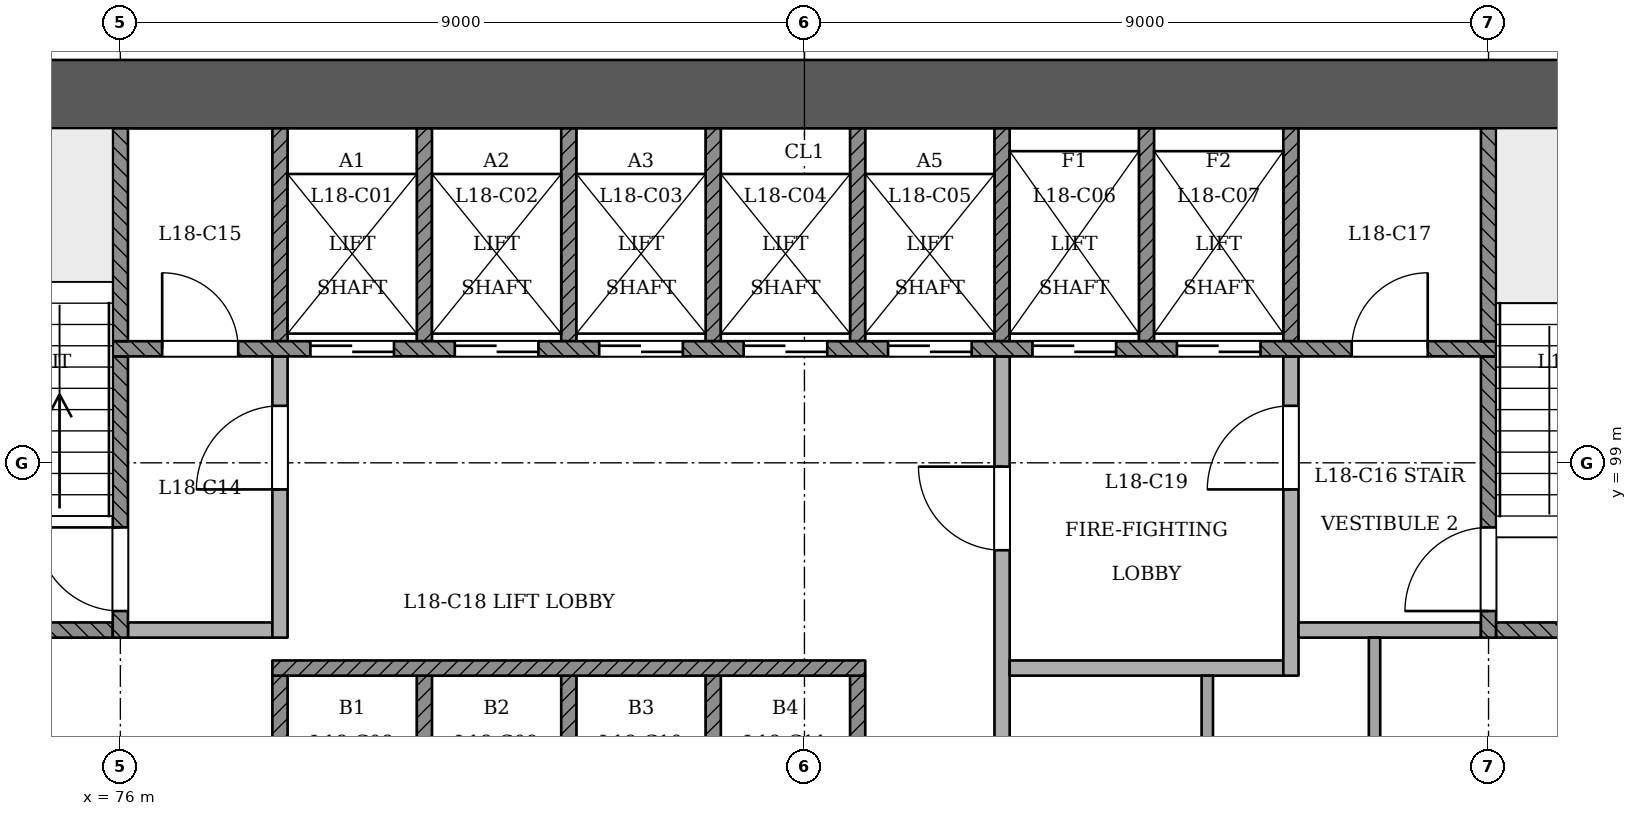
"""IFC4 building model, lengths in metres.
Left out: names, types, materials, properties, quantities, classifications, styles, units other than length and angle.
Written with IfcOpenShell. Run it as: python <this file> out.ifc"""

import sys

from ifc_helpers import new_model, si_unit, direction, frame, frame_2d, origin, place, context, subcontext, project, spatial, rectangle, extrude, element, fill, save


model = new_model("IFC4")
c1 = context("Model", 3, precision=1e-05, world=origin(), true_north=direction((0.0, 1.0)))
c2 = subcontext(c1, "Body", "Model", "MODEL_VIEW")
j1 = project(units=[si_unit("LENGTHUNIT", "METRE"), si_unit("PLANEANGLEUNIT", "RADIAN")], contexts=[c1])
p1 = place(None, origin())
s1 = spatial("IfcSite", under=j1, at=p1, CompositionType="ELEMENT")
p2 = place(p1, origin())
s2 = spatial("IfcBuilding", under=s1, at=p2, CompositionType="ELEMENT")
p3 = place(p2, frame((0.0, 0.0, 73.8)))
s3 = spatial("IfcBuildingStorey", under=s2, at=p3, CompositionType="ELEMENT", Elevation=73.8)
p4 = place(p3, frame((97.45, 103.85, 0.0), z_axis=(0.0, 0.0, 1.0), x_axis=(-1.0, 0.0, 0.0)))
e1 = element("IfcWall", 1, at=p4, inside=s3, PredefinedType="SHEAR", context=c2, shape_type="SweptSolid", body=[
    extrude(rectangle(XDim=25.35, YDim=0.9, at=frame_2d((12.675, 0.0))), origin(), (0.0, 0.0, 1.0), 3.6),
])
p5 = place(p3, frame((85.747, 59.896, 0.0), z_axis=(0.0, 0.0, 1.0), x_axis=(0.500002549277, 0.866023931954, 0.0)))
e2 = element("IfcWall", 2, at=p5, inside=s3, PredefinedType="PARTITIONING", context=c2, shape_type="SweptSolid", body=[
    extrude(rectangle(XDim=43.082, YDim=0.15, at=frame_2d((21.541, 0.0))), origin(), (0.0, 0.0, 1.0), 2.7),
])
p6 = place(p5, frame((0.244, 0.0, 0.0)))
e3 = element("IfcOpeningElement", 3, at=p6, cuts=e2, PredefinedType="OPENING", context=c2, shape_type="SweptSolid", body=[
    extrude(rectangle(XDim=1.2, YDim=2.1, at=frame_2d((0.6, 1.05))), frame((0.0, 0.085, 0.0), z_axis=(0.0, -1.0, 0.0), x_axis=(1.0, 0.0, 0.0)), (0.0, 0.0, 1.0), 0.171),
])
p7 = place(p5, frame((4.146, 0.0, 0.0)))
e4 = element("IfcOpeningElement", 4, at=p7, cuts=e2, PredefinedType="OPENING", context=c2, shape_type="SweptSolid", body=[
    extrude(rectangle(XDim=1.0, YDim=2.1, at=frame_2d((0.5, 1.05))), frame((0.0, 0.085, 0.0), z_axis=(0.0, -1.0, 0.0), x_axis=(1.0, 0.0, 0.0)), (0.0, 0.0, 1.0), 0.171),
])
p8 = place(p5, frame((10.821, 0.0, 0.0)))
e5 = element("IfcOpeningElement", 5, at=p8, cuts=e2, PredefinedType="OPENING", context=c2, shape_type="SweptSolid", body=[
    extrude(rectangle(XDim=1.0, YDim=2.1, at=frame_2d((0.5, 1.05))), frame((0.0, 0.085, 0.0), z_axis=(0.0, -1.0, 0.0), x_axis=(1.0, 0.0, 0.0)), (0.0, 0.0, 1.0), 0.171),
])
p9 = place(p5, frame((13.262, 0.0, 0.0)))
e6 = element("IfcOpeningElement", 6, at=p9, cuts=e2, PredefinedType="OPENING", context=c2, shape_type="SweptSolid", body=[
    extrude(rectangle(XDim=1.0, YDim=2.1, at=frame_2d((0.5, 1.05))), frame((0.0, 0.085, 0.0), z_axis=(0.0, -1.0, 0.0), x_axis=(1.0, 0.0, 0.0)), (0.0, 0.0, 1.0), 0.171),
])
p10 = place(p5, frame((20.941, 0.0, 0.0)))
e7 = element("IfcOpeningElement", 7, at=p10, cuts=e2, PredefinedType="OPENING", context=c2, shape_type="SweptSolid", body=[
    extrude(rectangle(XDim=1.2, YDim=2.1, at=frame_2d((0.6, 1.05))), frame((0.0, 0.085, 0.0), z_axis=(0.0, -1.0, 0.0), x_axis=(1.0, 0.0, 0.0)), (0.0, 0.0, 1.0), 0.171),
])
p11 = place(p5, frame((28.821, 0.0, 0.0)))
e8 = element("IfcOpeningElement", 8, at=p11, cuts=e2, PredefinedType="OPENING", context=c2, shape_type="SweptSolid", body=[
    extrude(rectangle(XDim=1.0, YDim=2.1, at=frame_2d((0.5, 1.05))), frame((0.0, 0.085, 0.0), z_axis=(0.0, -1.0, 0.0), x_axis=(1.0, 0.0, 0.0)), (0.0, 0.0, 1.0), 0.171),
])
p12 = place(p5, frame((31.112, 0.0, 0.0)))
e9 = element("IfcOpeningElement", 9, at=p12, cuts=e2, PredefinedType="OPENING", context=c2, shape_type="SweptSolid", body=[
    extrude(rectangle(XDim=1.1, YDim=2.1, at=frame_2d((0.55, 1.05))), frame((0.0, 0.085, 0.0), z_axis=(0.0, -1.0, 0.0), x_axis=(1.0, 0.0, 0.0)), (0.0, 0.0, 1.0), 0.171),
])
p13 = place(p5, frame((38.514, 0.0, 0.0)))
e10 = element("IfcOpeningElement", 10, at=p13, cuts=e2, PredefinedType="OPENING", context=c2, shape_type="SweptSolid", body=[
    extrude(rectangle(XDim=1.2, YDim=2.1, at=frame_2d((0.6, 1.05))), frame((0.0, 0.085, 0.0), z_axis=(0.0, -1.0, 0.0), x_axis=(1.0, 0.0, 0.0)), (0.0, 0.0, 1.0), 0.171),
])
for number, where, z_axis, x_axis in (
    (11, (78.1, 93.4, 0.0), (0.0, 0.0, 1.0), (0.0, 1.0, 0.0)),
    (12, (80.0, 93.4, 0.0), (0.0, 0.0, 1.0), (0.0, 1.0, 0.0)),
    (13, (81.9, 93.4, 0.0), (0.0, 0.0, 1.0), (0.0, 1.0, 0.0)),
    (14, (83.8, 93.4, 0.0), (0.0, 0.0, 1.0), (0.0, 1.0, 0.0)),
    (15, (85.7, 93.4, 0.0), (0.0, 0.0, 1.0), (0.0, 1.0, 0.0)),
):
    element("IfcWall", number, at=place(p3, frame(where, z_axis=z_axis, x_axis=x_axis)), inside=s3, PredefinedType="SOLIDWALL", context=c2, shape_type="SweptSolid", body=[
        extrude(rectangle(XDim=2.8, YDim=0.2, at=frame_2d((1.4, 0.0))), origin(), (0.0, 0.0, 1.0), 3.1),
    ])
p14 = place(p3, frame((87.6, 93.4, 0.0), z_axis=(0.0, 0.0, 1.0), x_axis=(0.0, 1.0, 0.0)))
e16 = element("IfcWall", 16, at=p14, inside=s3, PredefinedType="PARTITIONING", context=c2, shape_type="SweptSolid", body=[
    extrude(rectangle(XDim=7.0, YDim=0.2, at=frame_2d((3.5, 0.0))), origin(), (0.0, 0.0, 1.0), 3.1),
])
p15 = place(p14, frame((4.45, 0.0, 0.0)))
e17 = element("IfcOpeningElement", 17, at=p15, cuts=e16, PredefinedType="OPENING", context=c2, shape_type="SweptSolid", body=[
    extrude(rectangle(XDim=1.1, YDim=2.1, at=frame_2d((0.55, 1.05))), frame((0.0, 0.11, 0.0), z_axis=(0.0, -1.0, 0.0), x_axis=(1.0, 0.0, 0.0)), (0.0, 0.0, 1.0), 0.221),
])
p16 = place(p3, frame((90.3, 93.4, 0.0), z_axis=(0.0, 0.0, 1.0), x_axis=(0.0, 1.0, 0.0)))
e18 = element("IfcWall", 18, at=p16, inside=s3, PredefinedType="PARTITIONING", context=c2, shape_type="SweptSolid", body=[
    extrude(rectangle(XDim=2.8, YDim=0.15, at=frame_2d((1.4, 0.0))), origin(), (0.0, 0.0, 1.0), 3.1),
])
p17 = place(p3, frame((92.5, 93.4, 0.0), z_axis=(0.0, 0.0, 1.0), x_axis=(0.0, 1.0, 0.0)))
e19 = element("IfcWall", 19, at=p17, inside=s3, PredefinedType="PARTITIONING", context=c2, shape_type="SweptSolid", body=[
    extrude(rectangle(XDim=3.3, YDim=0.15, at=frame_2d((1.65, 0.0))), origin(), (0.0, 0.0, 1.0), 3.1),
])
p18 = place(p3, frame((78.0, 96.3, 0.0), z_axis=(0.0, 0.0, 1.0), x_axis=(1.0, 0.0, 0.0)))
e20 = element("IfcWall", 20, at=p18, inside=s3, PredefinedType="SOLIDWALL", context=c2, shape_type="SweptSolid", body=[
    extrude(rectangle(XDim=7.8, YDim=0.2, at=frame_2d((3.9, 0.0))), origin(), (0.0, 0.0, 1.0), 3.1),
])
p19 = place(p3, frame((87.7, 96.3, 0.0), z_axis=(0.0, 0.0, 1.0), x_axis=(1.0, 0.0, 0.0)))
e21 = element("IfcWall", 21, at=p19, inside=s3, PredefinedType="PARTITIONING", context=c2, shape_type="SweptSolid", body=[
    extrude(rectangle(XDim=3.6, YDim=0.2, at=frame_2d((1.8, 0.0))), origin(), (0.0, 0.0, 1.0), 3.1),
])
p20 = place(p3, frame((91.4, 96.2, 0.0), z_axis=(0.0, 0.0, 1.0), x_axis=(0.0, 1.0, 0.0)))
e22 = element("IfcWall", 22, at=p20, inside=s3, PredefinedType="PARTITIONING", context=c2, shape_type="SweptSolid", body=[
    extrude(rectangle(XDim=4.2, YDim=0.2, at=frame_2d((2.1, 0.0))), origin(), (0.0, 0.0, 1.0), 3.1),
])
p21 = place(p20, frame((2.45, 0.0, 0.0)))
e23 = element("IfcOpeningElement", 23, at=p21, cuts=e22, PredefinedType="OPENING", context=c2, shape_type="SweptSolid", body=[
    extrude(rectangle(XDim=1.1, YDim=2.1, at=frame_2d((0.55, 1.05))), frame((0.0, 0.11, 0.0), z_axis=(0.0, -1.0, 0.0), x_axis=(1.0, 0.0, 0.0)), (0.0, 0.0, 1.0), 0.221),
])
p22 = place(p3, frame((73.0, 96.8, 0.0), z_axis=(0.0, 0.0, 1.0), x_axis=(1.0, 0.0, 0.0)))
e24 = element("IfcWall", 24, at=p22, inside=s3, PredefinedType="SOLIDWALL", context=c2, shape_type="SweptSolid", body=[
    extrude(rectangle(XDim=2.9, YDim=0.2, at=frame_2d((1.45, 0.0))), origin(), (0.0, 0.0, 1.0), 3.1),
])
p23 = place(p3, frame((76.0, 96.7, 0.0), z_axis=(0.0, 0.0, 1.0), x_axis=(0.0, 1.0, 0.0)))
e25 = element("IfcWall", 25, at=p23, inside=s3, PredefinedType="SOLIDWALL", context=c2, shape_type="SweptSolid", body=[
    extrude(rectangle(XDim=3.7, YDim=0.2, at=frame_2d((1.85, 0.0))), origin(), (0.0, 0.0, 1.0), 3.1),
])
p24 = place(p23, frame((0.35, 0.0, 0.0)))
e26 = element("IfcOpeningElement", 26, at=p24, cuts=e25, PredefinedType="OPENING", context=c2, shape_type="SweptSolid", body=[
    extrude(rectangle(XDim=1.1, YDim=2.1, at=frame_2d((0.55, 1.05))), frame((0.0, 0.11, 0.0), z_axis=(0.0, -1.0, 0.0), x_axis=(1.0, 0.0, 0.0)), (0.0, 0.0, 1.0), 0.221),
])
p25 = place(p3, frame((76.1, 96.8, 0.0), z_axis=(0.0, 0.0, 1.0), x_axis=(1.0, 0.0, 0.0)))
e27 = element("IfcWall", 27, at=p25, inside=s3, PredefinedType="PARTITIONING", context=c2, shape_type="SweptSolid", body=[
    extrude(rectangle(XDim=1.9, YDim=0.2, at=frame_2d((0.95, 0.0))), origin(), (0.0, 0.0, 1.0), 3.1),
])
p26 = place(p3, frame((78.1, 96.7, 0.0), z_axis=(0.0, 0.0, 1.0), x_axis=(0.0, 1.0, 0.0)))
e28 = element("IfcWall", 28, at=p26, inside=s3, PredefinedType="PARTITIONING", context=c2, shape_type="SweptSolid", body=[
    extrude(rectangle(XDim=3.7, YDim=0.2, at=frame_2d((1.85, 0.0))), origin(), (0.0, 0.0, 1.0), 3.1),
])
p27 = place(p26, frame((1.95, 0.0, 0.0)))
e29 = element("IfcOpeningElement", 29, at=p27, cuts=e28, PredefinedType="OPENING", context=c2, shape_type="SweptSolid", body=[
    extrude(rectangle(XDim=1.1, YDim=2.1, at=frame_2d((0.55, 1.05))), frame((0.0, 0.11, 0.0), z_axis=(0.0, -1.0, 0.0), x_axis=(1.0, 0.0, 0.0)), (0.0, 0.0, 1.0), 0.221),
])
p28 = place(p3, frame((91.5, 96.8, 0.0), z_axis=(0.0, 0.0, 1.0), x_axis=(1.0, 0.0, 0.0)))
e30 = element("IfcWall", 30, at=p28, inside=s3, PredefinedType="PARTITIONING", context=c2, shape_type="SweptSolid", body=[
    extrude(rectangle(XDim=2.4, YDim=0.2, at=frame_2d((1.2, 0.0))), origin(), (0.0, 0.0, 1.0), 3.1),
])
p29 = place(p3, frame((94.0, 96.7, 0.0), z_axis=(0.0, 0.0, 1.0), x_axis=(0.0, 1.0, 0.0)))
e31 = element("IfcWall", 31, at=p29, inside=s3, PredefinedType="SOLIDWALL", context=c2, shape_type="SweptSolid", body=[
    extrude(rectangle(XDim=3.7, YDim=0.2, at=frame_2d((1.85, 0.0))), origin(), (0.0, 0.0, 1.0), 3.1),
])
p30 = place(p29, frame((0.35, 0.0, 0.0)))
e32 = element("IfcOpeningElement", 32, at=p30, cuts=e31, PredefinedType="OPENING", context=c2, shape_type="SweptSolid", body=[
    extrude(rectangle(XDim=1.1, YDim=2.1, at=frame_2d((0.55, 1.05))), frame((0.0, 0.11, 0.0), z_axis=(0.0, -1.0, 0.0), x_axis=(1.0, 0.0, 0.0)), (0.0, 0.0, 1.0), 0.221),
])
p31 = place(p3, frame((94.1, 96.8, 0.0), z_axis=(0.0, 0.0, 1.0), x_axis=(1.0, 0.0, 0.0)))
e33 = element("IfcWall", 33, at=p31, inside=s3, PredefinedType="SOLIDWALL", context=c2, shape_type="SweptSolid", body=[
    extrude(rectangle(XDim=2.9, YDim=0.2, at=frame_2d((1.45, 0.0))), origin(), (0.0, 0.0, 1.0), 3.1),
])
p32 = place(p3, frame((75.9, 100.5, 0.0), z_axis=(0.0, 0.0, 1.0), x_axis=(1.0, 0.0, 0.0)))
e34 = element("IfcWall", 34, at=p32, inside=s3, PredefinedType="SOLIDWALL", context=c2, shape_type="SweptSolid", body=[
    extrude(rectangle(XDim=18.2, YDim=0.2, at=frame_2d((9.1, 0.0))), origin(), (0.0, 0.0, 1.0), 3.1),
])
p33 = place(p32, frame((2.6, 0.0, 0.0)))
e35 = element("IfcOpeningElement", 35, at=p33, cuts=e34, PredefinedType="OPENING", context=c2, shape_type="SweptSolid", body=[
    extrude(rectangle(XDim=1.1, YDim=2.1, at=frame_2d((0.55, 1.05))), frame((0.0, 0.11, 0.0), z_axis=(0.0, -1.0, 0.0), x_axis=(1.0, 0.0, 0.0)), (0.0, 0.0, 1.0), 0.221),
])
p34 = place(p32, frame((4.5, 0.0, 0.0)))
e36 = element("IfcOpeningElement", 36, at=p34, cuts=e34, PredefinedType="OPENING", context=c2, shape_type="SweptSolid", body=[
    extrude(rectangle(XDim=1.1, YDim=2.1, at=frame_2d((0.55, 1.05))), frame((0.0, 0.11, 0.0), z_axis=(0.0, -1.0, 0.0), x_axis=(1.0, 0.0, 0.0)), (0.0, 0.0, 1.0), 0.221),
])
p35 = place(p32, frame((6.4, 0.0, 0.0)))
e37 = element("IfcOpeningElement", 37, at=p35, cuts=e34, PredefinedType="OPENING", context=c2, shape_type="SweptSolid", body=[
    extrude(rectangle(XDim=1.1, YDim=2.1, at=frame_2d((0.55, 1.05))), frame((0.0, 0.11, 0.0), z_axis=(0.0, -1.0, 0.0), x_axis=(1.0, 0.0, 0.0)), (0.0, 0.0, 1.0), 0.221),
])
p36 = place(p32, frame((8.3, 0.0, 0.0)))
e38 = element("IfcOpeningElement", 38, at=p36, cuts=e34, PredefinedType="OPENING", context=c2, shape_type="SweptSolid", body=[
    extrude(rectangle(XDim=1.1, YDim=2.1, at=frame_2d((0.55, 1.05))), frame((0.0, 0.11, 0.0), z_axis=(0.0, -1.0, 0.0), x_axis=(1.0, 0.0, 0.0)), (0.0, 0.0, 1.0), 0.221),
])
p37 = place(p32, frame((10.2, 0.0, 0.0)))
e39 = element("IfcOpeningElement", 39, at=p37, cuts=e34, PredefinedType="OPENING", context=c2, shape_type="SweptSolid", body=[
    extrude(rectangle(XDim=1.1, YDim=2.1, at=frame_2d((0.55, 1.05))), frame((0.0, 0.11, 0.0), z_axis=(0.0, -1.0, 0.0), x_axis=(1.0, 0.0, 0.0)), (0.0, 0.0, 1.0), 0.221),
])
p38 = place(p32, frame((12.1, 0.0, 0.0)))
e40 = element("IfcOpeningElement", 40, at=p38, cuts=e34, PredefinedType="OPENING", context=c2, shape_type="SweptSolid", body=[
    extrude(rectangle(XDim=1.1, YDim=2.1, at=frame_2d((0.55, 1.05))), frame((0.0, 0.11, 0.0), z_axis=(0.0, -1.0, 0.0), x_axis=(1.0, 0.0, 0.0)), (0.0, 0.0, 1.0), 0.221),
])
p39 = place(p32, frame((14.0, 0.0, 0.0)))
e41 = element("IfcOpeningElement", 41, at=p39, cuts=e34, PredefinedType="OPENING", context=c2, shape_type="SweptSolid", body=[
    extrude(rectangle(XDim=1.1, YDim=2.1, at=frame_2d((0.55, 1.05))), frame((0.0, 0.11, 0.0), z_axis=(0.0, -1.0, 0.0), x_axis=(1.0, 0.0, 0.0)), (0.0, 0.0, 1.0), 0.221),
])
p40 = place(p32, frame((0.65, 0.0, 0.0)))
e42 = element("IfcOpeningElement", 42, at=p40, cuts=e34, PredefinedType="OPENING", context=c2, shape_type="SweptSolid", body=[
    extrude(rectangle(XDim=1.0, YDim=2.1, at=frame_2d((0.5, 1.05))), frame((0.0, 0.11, 0.0), z_axis=(0.0, -1.0, 0.0), x_axis=(1.0, 0.0, 0.0)), (0.0, 0.0, 1.0), 0.221),
])
p41 = place(p32, frame((16.3, 0.0, 0.0)))
e43 = element("IfcOpeningElement", 43, at=p41, cuts=e34, PredefinedType="OPENING", context=c2, shape_type="SweptSolid", body=[
    extrude(rectangle(XDim=1.0, YDim=2.1, at=frame_2d((0.5, 1.05))), frame((0.0, 0.11, 0.0), z_axis=(0.0, -1.0, 0.0), x_axis=(1.0, 0.0, 0.0)), (0.0, 0.0, 1.0), 0.221),
])
for number, where, z_axis, x_axis in (
    (44, (76.0, 100.6, 0.0), (0.0, 0.0, 1.0), (0.0, 1.0, 0.0)),
    (45, (78.1, 100.6, 0.0), (0.0, 0.0, 1.0), (0.0, 1.0, 0.0)),
    (46, (80.0, 100.6, 0.0), (0.0, 0.0, 1.0), (0.0, 1.0, 0.0)),
    (47, (81.9, 100.6, 0.0), (0.0, 0.0, 1.0), (0.0, 1.0, 0.0)),
    (48, (83.8, 100.6, 0.0), (0.0, 0.0, 1.0), (0.0, 1.0, 0.0)),
    (49, (85.7, 100.6, 0.0), (0.0, 0.0, 1.0), (0.0, 1.0, 0.0)),
    (50, (87.6, 100.6, 0.0), (0.0, 0.0, 1.0), (0.0, 1.0, 0.0)),
    (51, (89.5, 100.6, 0.0), (0.0, 0.0, 1.0), (0.0, 1.0, 0.0)),
    (52, (91.4, 100.6, 0.0), (0.0, 0.0, 1.0), (0.0, 1.0, 0.0)),
    (53, (94.0, 100.6, 0.0), (0.0, 0.0, 1.0), (0.0, 1.0, 0.0)),
):
    element("IfcWall", number, at=place(p3, frame(where, z_axis=z_axis, x_axis=x_axis)), inside=s3, PredefinedType="SOLIDWALL", context=c2, shape_type="SweptSolid", body=[
        extrude(rectangle(XDim=2.8, YDim=0.2, at=frame_2d((1.4, 0.0))), origin(), (0.0, 0.0, 1.0), 3.1),
    ])
p42 = place(p33, origin())
e54 = element("IfcDoor", 54, at=p42, inside=s3, OperationType="SLIDING_TO_RIGHT", PredefinedType="NOTDEFINED", context=c2, shape_type="SweptSolid", body=[
    extrude(rectangle(XDim=1.1, YDim=2.1, at=frame_2d((0.55, 1.05))), frame((0.0, 0.025, 0.0), z_axis=(0.0, -1.0, 0.0), x_axis=(1.0, 0.0, 0.0)), (0.0, 0.0, 1.0), 0.05),
])
fill(e35, e54)
p43 = place(p34, origin())
e55 = element("IfcDoor", 55, at=p43, inside=s3, OperationType="SLIDING_TO_LEFT", PredefinedType="NOTDEFINED", context=c2, shape_type="SweptSolid", body=[
    extrude(rectangle(XDim=1.1, YDim=2.1, at=frame_2d((0.55, 1.05))), frame((0.0, 0.025, 0.0), z_axis=(0.0, -1.0, 0.0), x_axis=(1.0, 0.0, 0.0)), (0.0, 0.0, 1.0), 0.05),
])
fill(e36, e55)
p44 = place(p35, origin())
e56 = element("IfcDoor", 56, at=p44, inside=s3, OperationType="SLIDING_TO_RIGHT", PredefinedType="NOTDEFINED", context=c2, shape_type="SweptSolid", body=[
    extrude(rectangle(XDim=1.1, YDim=2.1, at=frame_2d((0.55, 1.05))), frame((0.0, 0.025, 0.0), z_axis=(0.0, -1.0, 0.0), x_axis=(1.0, 0.0, 0.0)), (0.0, 0.0, 1.0), 0.05),
])
fill(e37, e56)
p45 = place(p36, origin())
e57 = element("IfcDoor", 57, at=p45, inside=s3, OperationType="SLIDING_TO_LEFT", PredefinedType="NOTDEFINED", context=c2, shape_type="SweptSolid", body=[
    extrude(rectangle(XDim=1.1, YDim=2.1, at=frame_2d((0.55, 1.05))), frame((0.0, 0.025, 0.0), z_axis=(0.0, -1.0, 0.0), x_axis=(1.0, 0.0, 0.0)), (0.0, 0.0, 1.0), 0.05),
])
fill(e38, e57)
p46 = place(p37, origin())
e58 = element("IfcDoor", 58, at=p46, inside=s3, OperationType="SLIDING_TO_RIGHT", PredefinedType="NOTDEFINED", context=c2, shape_type="SweptSolid", body=[
    extrude(rectangle(XDim=1.1, YDim=2.1, at=frame_2d((0.55, 1.05))), frame((0.0, 0.025, 0.0), z_axis=(0.0, -1.0, 0.0), x_axis=(1.0, 0.0, 0.0)), (0.0, 0.0, 1.0), 0.05),
])
fill(e39, e58)
p47 = place(p38, origin())
e59 = element("IfcDoor", 59, at=p47, inside=s3, OperationType="SLIDING_TO_RIGHT", PredefinedType="NOTDEFINED", context=c2, shape_type="SweptSolid", body=[
    extrude(rectangle(XDim=1.1, YDim=2.1, at=frame_2d((0.55, 1.05))), frame((0.0, 0.025, 0.0), z_axis=(0.0, -1.0, 0.0), x_axis=(1.0, 0.0, 0.0)), (0.0, 0.0, 1.0), 0.05),
])
fill(e40, e59)
p48 = place(p39, origin())
e60 = element("IfcDoor", 60, at=p48, inside=s3, OperationType="SLIDING_TO_LEFT", PredefinedType="NOTDEFINED", context=c2, shape_type="SweptSolid", body=[
    extrude(rectangle(XDim=1.1, YDim=2.1, at=frame_2d((0.55, 1.05))), frame((0.0, 0.025, 0.0), z_axis=(0.0, -1.0, 0.0), x_axis=(1.0, 0.0, 0.0)), (0.0, 0.0, 1.0), 0.05),
])
fill(e41, e60)
p49 = place(p24, origin())
e61 = element("IfcDoor", 61, at=p49, inside=s3, OperationType="SINGLE_SWING_RIGHT", PredefinedType="NOTDEFINED", context=c2, shape_type="SweptSolid", body=[
    extrude(rectangle(XDim=1.1, YDim=2.1, at=frame_2d((0.55, 1.05))), frame((0.0, 0.025, 0.0), z_axis=(0.0, -1.0, 0.0), x_axis=(1.0, 0.0, 0.0)), (0.0, 0.0, 1.0), 0.05),
])
fill(e26, e61)
p50 = place(p30, origin())
e62 = element("IfcDoor", 62, at=p50, inside=s3, OperationType="SINGLE_SWING_LEFT", PredefinedType="NOTDEFINED", context=c2, shape_type="SweptSolid", body=[
    extrude(rectangle(XDim=1.1, YDim=2.1, at=frame_2d((0.55, 1.05))), frame((0.0, 0.025, 0.0), z_axis=(0.0, -1.0, 0.0), x_axis=(1.0, 0.0, 0.0)), (0.0, 0.0, 1.0), 0.05),
])
fill(e32, e62)
p51 = place(p27, origin())
e63 = element("IfcDoor", 63, at=p51, inside=s3, OperationType="SINGLE_SWING_LEFT", PredefinedType="NOTDEFINED", context=c2, shape_type="SweptSolid", body=[
    extrude(rectangle(XDim=1.1, YDim=2.1, at=frame_2d((0.55, 1.05))), frame((0.0, 0.025, 0.0), z_axis=(0.0, -1.0, 0.0), x_axis=(1.0, 0.0, 0.0)), (0.0, 0.0, 1.0), 0.05),
])
fill(e29, e63)
p52 = place(p15, origin())
e64 = element("IfcDoor", 64, at=p52, inside=s3, OperationType="SINGLE_SWING_RIGHT", PredefinedType="NOTDEFINED", context=c2, shape_type="SweptSolid", body=[
    extrude(rectangle(XDim=1.1, YDim=2.1, at=frame_2d((0.55, 1.05))), frame((0.0, 0.025, 0.0), z_axis=(0.0, -1.0, 0.0), x_axis=(1.0, 0.0, 0.0)), (0.0, 0.0, 1.0), 0.05),
])
fill(e17, e64)
p53 = place(p21, origin())
e65 = element("IfcDoor", 65, at=p53, inside=s3, OperationType="SINGLE_SWING_LEFT", PredefinedType="NOTDEFINED", context=c2, shape_type="SweptSolid", body=[
    extrude(rectangle(XDim=1.1, YDim=2.1, at=frame_2d((0.55, 1.05))), frame((0.0, 0.025, 0.0), z_axis=(0.0, -1.0, 0.0), x_axis=(1.0, 0.0, 0.0)), (0.0, 0.0, 1.0), 0.05),
])
fill(e23, e65)
p54 = place(p40, origin())
e66 = element("IfcDoor", 66, at=p54, inside=s3, OperationType="SINGLE_SWING_LEFT", PredefinedType="NOTDEFINED", context=c2, shape_type="SweptSolid", body=[
    extrude(rectangle(XDim=1.0, YDim=2.1, at=frame_2d((0.5, 1.05))), frame((0.0, 0.025, 0.0), z_axis=(0.0, -1.0, 0.0), x_axis=(1.0, 0.0, 0.0)), (0.0, 0.0, 1.0), 0.05),
])
fill(e42, e66)
p55 = place(p41, origin())
e67 = element("IfcDoor", 67, at=p55, inside=s3, OperationType="SINGLE_SWING_RIGHT", PredefinedType="NOTDEFINED", context=c2, shape_type="SweptSolid", body=[
    extrude(rectangle(XDim=1.0, YDim=2.1, at=frame_2d((0.5, 1.05))), frame((0.0, 0.025, 0.0), z_axis=(0.0, -1.0, 0.0), x_axis=(1.0, 0.0, 0.0)), (0.0, 0.0, 1.0), 0.05),
])
fill(e43, e67)
save(model, sys.argv[1])
